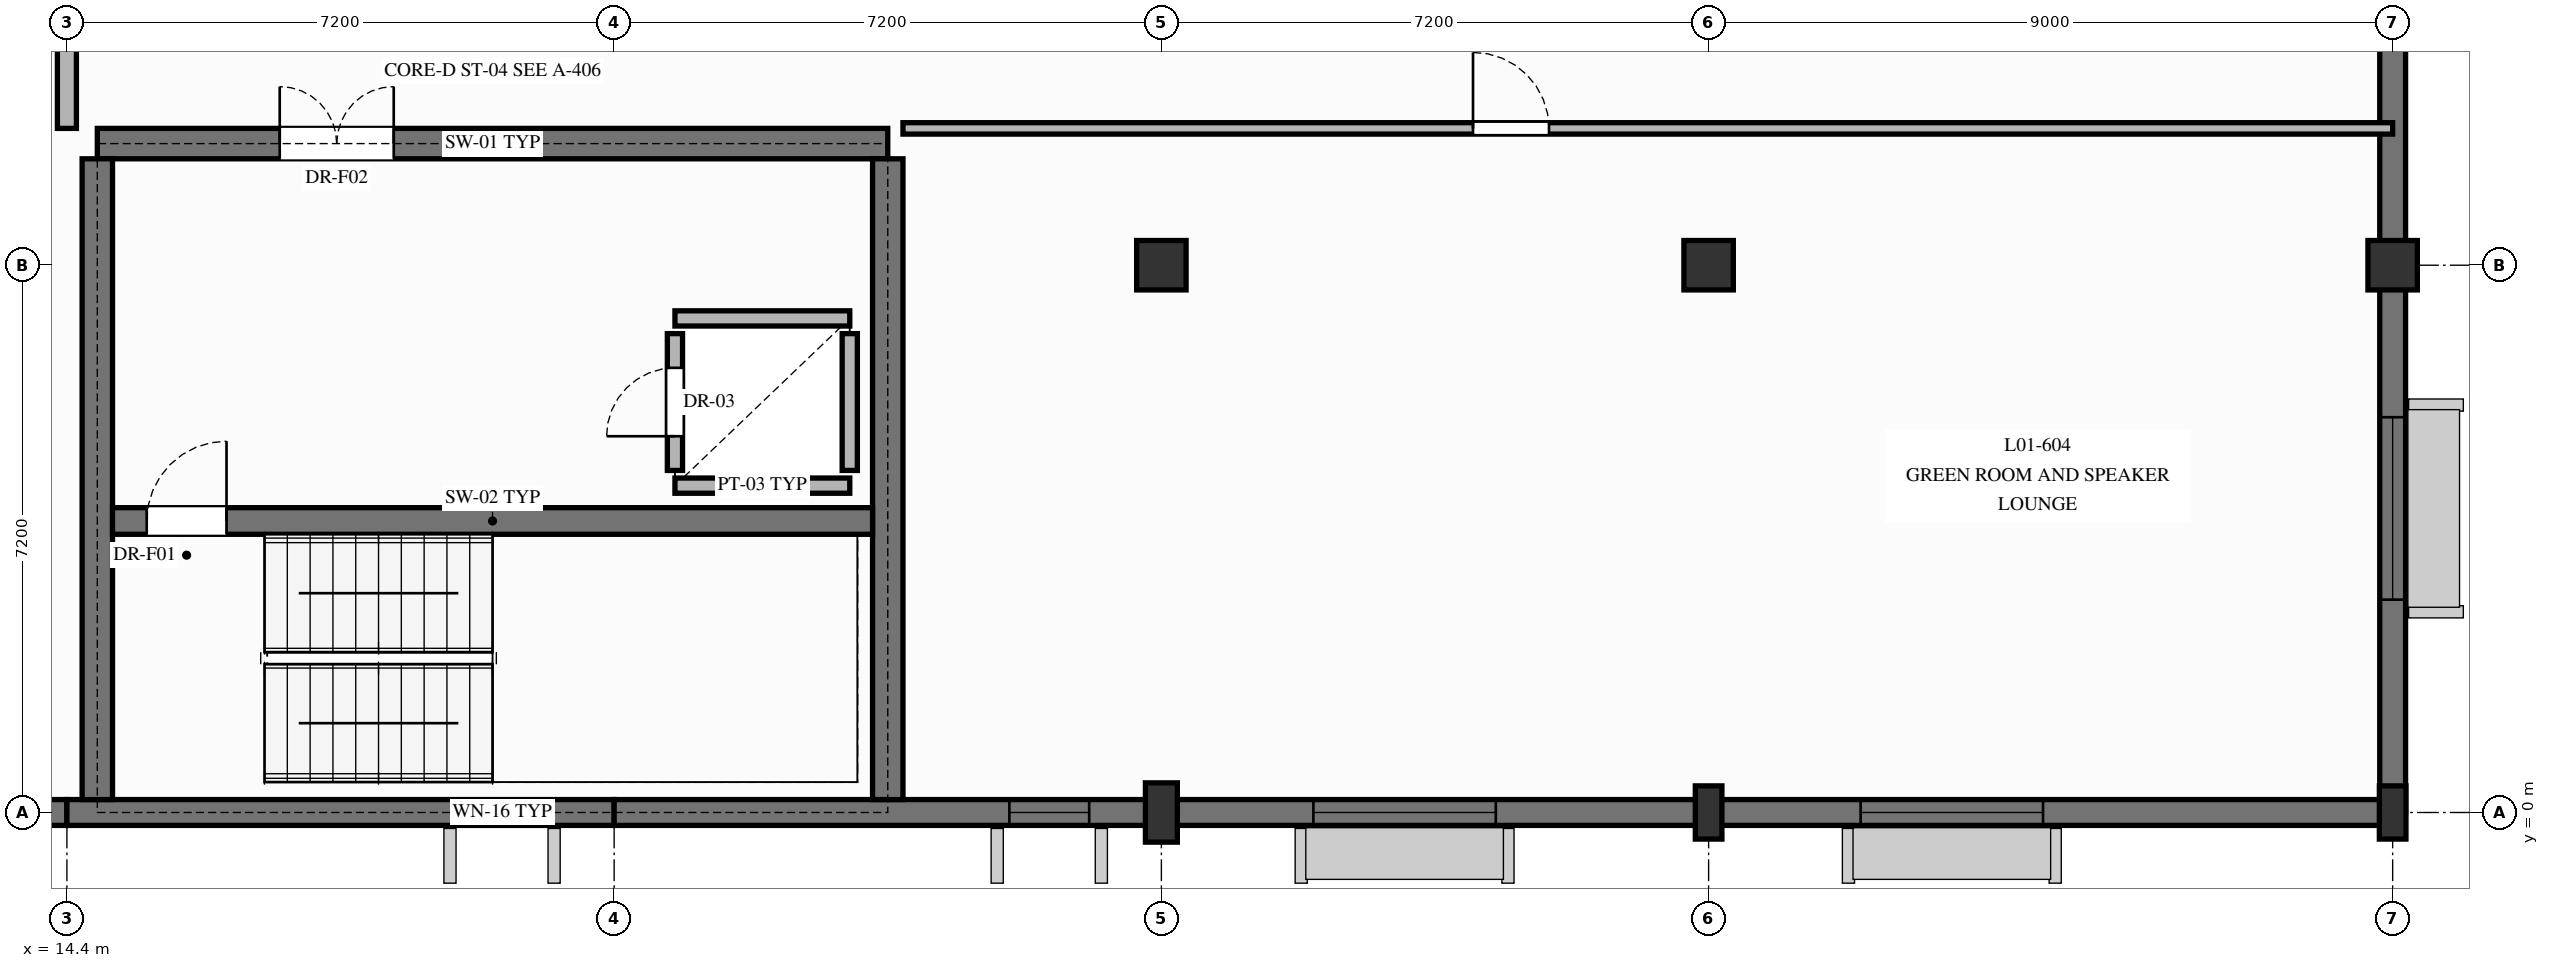
"""IFC4 building model, lengths in metres.
Left out: names, types, materials, properties, quantities, classifications, styles, units other than length and angle.
Written with IfcOpenShell. Run it as: python <this file> out.ifc"""

import sys

from ifc_helpers import new_model, si_unit, direction, frame, frame_2d, origin, origin_2d, place, context, subcontext, project, spatial, rectangle, extrude, element, fill, save


model = new_model("IFC4")
c1 = context("Model", 3, precision=1e-05, world=origin(), true_north=direction((0.0, 1.0)))
c2 = subcontext(c1, "Body", "Model", "MODEL_VIEW")
j1 = project(units=[si_unit("LENGTHUNIT", "METRE"), si_unit("PLANEANGLEUNIT", "RADIAN")], contexts=[c1])
p1 = place(None, origin())
s1 = spatial("IfcSite", under=j1, at=p1, CompositionType="ELEMENT")
p2 = place(p1, origin())
s2 = spatial("IfcBuilding", under=s1, at=p2, CompositionType="ELEMENT")
p3 = place(p2, frame((0.0, 0.0, 5.1)))
s3 = spatial("IfcBuildingStorey", under=s2, at=p3, CompositionType="ELEMENT", Elevation=5.1)
p4 = place(p3, frame((28.8, 0.0, 0.0), z_axis=(0.0, 0.0, 1.0), x_axis=(0.0, 1.0, 0.0)))
e1 = element("IfcColumn", 1, at=p4, inside=s3, PredefinedType="PILASTER", context=c2, shape_type="SweptSolid", body=[
    extrude(rectangle(XDim=0.42, YDim=0.78, at=origin_2d()), origin(), (0.0, 0.0, 1.0), 3.84),
])
p5 = place(p3, frame((28.8, 7.2, 0.0), z_axis=(0.0, 0.0, 1.0), x_axis=(1.0, 0.0, 0.0)))
e2 = element("IfcColumn", 2, at=p5, inside=s3, PredefinedType="COLUMN", context=c2, shape_type="SweptSolid", body=[
    extrude(rectangle(XDim=0.65, YDim=0.65, at=origin_2d()), origin(), (0.0, 0.0, 1.0), 3.84),
])
p6 = place(p3, frame((36.0, 0.0, 0.0), z_axis=(0.0, 0.0, 1.0), x_axis=(0.0, 1.0, 0.0)))
e3 = element("IfcColumn", 3, at=p6, inside=s3, PredefinedType="PILASTER", context=c2, shape_type="SweptSolid", body=[
    extrude(rectangle(XDim=0.35, YDim=0.7, at=origin_2d()), origin(), (0.0, 0.0, 1.0), 3.84),
])
p7 = place(p3, frame((36.0, 7.2, 0.0), z_axis=(0.0, 0.0, 1.0), x_axis=(1.0, 0.0, 0.0)))
e4 = element("IfcColumn", 4, at=p7, inside=s3, PredefinedType="COLUMN", context=c2, shape_type="SweptSolid", body=[
    extrude(rectangle(XDim=0.65, YDim=0.65, at=origin_2d()), origin(), (0.0, 0.0, 1.0), 3.84),
])
p8 = place(p3, frame((45.0, 0.0, 0.0), z_axis=(0.0, 0.0, 1.0), x_axis=(0.0, 1.0, 0.0)))
e5 = element("IfcColumn", 5, at=p8, inside=s3, PredefinedType="PILASTER", context=c2, shape_type="SweptSolid", body=[
    extrude(rectangle(XDim=0.35, YDim=0.7, at=origin_2d()), origin(), (0.0, 0.0, 1.0), 3.84),
])
p9 = place(p3, frame((45.0, 7.2, 0.0), z_axis=(0.0, 0.0, 1.0), x_axis=(1.0, 0.0, 0.0)))
e6 = element("IfcColumn", 6, at=p9, inside=s3, PredefinedType="COLUMN", context=c2, shape_type="SweptSolid", body=[
    extrude(rectangle(XDim=0.65, YDim=0.65, at=origin_2d()), origin(), (0.0, 0.0, 1.0), 3.84),
])
p10 = place(p3, frame((7.2, 0.0, 0.0), z_axis=(0.0, 0.0, 1.0), x_axis=(1.0, 0.0, 0.0)))
e7 = element("IfcWall", 7, at=p10, inside=s3, PredefinedType="SOLIDWALL", context=c2, shape_type="SweptSolid", body=[
    extrude(rectangle(XDim=7.2, YDim=0.34, at=frame_2d((3.6, 0.0))), origin(), (0.0, 0.0, 1.0), 3.55),
])
p11 = place(p10, frame((2.0, 0.0, 0.85)))
e8 = element("IfcOpeningElement", 8, at=p11, cuts=e7, PredefinedType="OPENING", context=c2, shape_type="SweptSolid", body=[
    extrude(rectangle(XDim=2.4, YDim=2.4, at=frame_2d((1.2, 1.2))), frame((0.0, 0.18, 0.0), z_axis=(0.0, -1.0, 0.0), x_axis=(1.0, 0.0, 0.0)), (0.0, 0.0, 1.0), 0.36),
])
p12 = place(p3, frame((14.4, 0.0, 0.0), z_axis=(0.0, 0.0, 1.0), x_axis=(1.0, 0.0, 0.0)))
e9 = element("IfcWall", 9, at=p12, inside=s3, PredefinedType="SOLIDWALL", context=c2, shape_type="SweptSolid", body=[
    extrude(rectangle(XDim=7.2, YDim=0.34, at=frame_2d((3.6, 0.0))), origin(), (0.0, 0.0, 1.0), 3.55),
])
p13 = place(p12, frame((5.2, 0.0, 1.05)))
e10 = element("IfcOpeningElement", 10, at=p13, cuts=e9, PredefinedType="OPENING", context=c2, shape_type="SweptSolid", body=[
    extrude(rectangle(XDim=1.05, YDim=1.75, at=frame_2d((0.525, 0.875))), frame((0.0, 0.18, 0.0), z_axis=(0.0, -1.0, 0.0), x_axis=(1.0, 0.0, 0.0)), (0.0, 0.0, 1.0), 0.36),
])
p14 = place(p3, frame((21.6, 0.0, 0.0), z_axis=(0.0, 0.0, 1.0), x_axis=(1.0, 0.0, 0.0)))
e11 = element("IfcWall", 11, at=p14, inside=s3, PredefinedType="SOLIDWALL", context=c2, shape_type="SweptSolid", body=[
    extrude(rectangle(XDim=7.2, YDim=0.34, at=frame_2d((3.6, 0.0))), origin(), (0.0, 0.0, 1.0), 3.55),
])
p15 = place(p14, frame((5.2, 0.0, 1.05)))
e12 = element("IfcOpeningElement", 12, at=p15, cuts=e11, PredefinedType="OPENING", context=c2, shape_type="SweptSolid", body=[
    extrude(rectangle(XDim=1.05, YDim=1.75, at=frame_2d((0.525, 0.875))), frame((0.0, 0.18, 0.0), z_axis=(0.0, -1.0, 0.0), x_axis=(1.0, 0.0, 0.0)), (0.0, 0.0, 1.0), 0.36),
])
p16 = place(p3, frame((28.8, 0.0, 0.0), z_axis=(0.0, 0.0, 1.0), x_axis=(1.0, 0.0, 0.0)))
e13 = element("IfcWall", 13, at=p16, inside=s3, PredefinedType="SOLIDWALL", context=c2, shape_type="SweptSolid", body=[
    extrude(rectangle(XDim=7.2, YDim=0.34, at=frame_2d((3.6, 0.0))), origin(), (0.0, 0.0, 1.0), 3.55),
])
p17 = place(p16, frame((2.0, 0.0, 0.435)))
e14 = element("IfcOpeningElement", 14, at=p17, cuts=e13, PredefinedType="OPENING", context=c2, shape_type="SweptSolid", body=[
    extrude(rectangle(XDim=2.4, YDim=2.4, at=frame_2d((1.2, 1.2))), frame((0.0, 0.18, 0.0), z_axis=(0.0, -1.0, 0.0), x_axis=(1.0, 0.0, 0.0)), (0.0, 0.0, 1.0), 0.36),
])
p18 = place(p3, frame((36.0, 0.0, 0.0), z_axis=(0.0, 0.0, 1.0), x_axis=(1.0, 0.0, 0.0)))
e15 = element("IfcWall", 15, at=p18, inside=s3, PredefinedType="SOLIDWALL", context=c2, shape_type="SweptSolid", body=[
    extrude(rectangle(XDim=9.0, YDim=0.34, at=frame_2d((4.5, 0.0))), origin(), (0.0, 0.0, 1.0), 3.55),
])
p19 = place(p18, frame((2.0, 0.0, 0.375)))
e16 = element("IfcOpeningElement", 16, at=p19, cuts=e15, PredefinedType="OPENING", context=c2, shape_type="SweptSolid", body=[
    extrude(rectangle(XDim=2.4, YDim=2.4, at=frame_2d((1.2, 1.2))), frame((0.0, 0.18, 0.0), z_axis=(0.0, -1.0, 0.0), x_axis=(1.0, 0.0, 0.0)), (0.0, 0.0, 1.0), 0.36),
])
p20 = place(p3, frame((45.0, 0.0, 0.0), z_axis=(0.0, 0.0, 1.0), x_axis=(0.0, 1.0, 0.0)))
e17 = element("IfcWall", 17, at=p20, inside=s3, PredefinedType="SOLIDWALL", context=c2, shape_type="SweptSolid", body=[
    extrude(rectangle(XDim=28.8, YDim=0.34, at=frame_2d((14.4, 0.0))), origin(), (0.0, 0.0, 1.0), 3.55),
])
p21 = place(p20, frame((2.8, 0.0, 0.255)))
e18 = element("IfcOpeningElement", 18, at=p21, cuts=e17, PredefinedType="OPENING", context=c2, shape_type="SweptSolid", body=[
    extrude(rectangle(XDim=2.4, YDim=2.4, at=frame_2d((1.2, 1.2))), frame((0.0, 0.18, 0.0), z_axis=(0.0, -1.0, 0.0), x_axis=(1.0, 0.0, 0.0)), (0.0, 0.0, 1.0), 0.36),
])
p22 = place(p20, frame((15.2, 0.0, 0.605)))
e19 = element("IfcOpeningElement", 19, at=p22, cuts=e17, PredefinedType="OPENING", context=c2, shape_type="SweptSolid", body=[
    extrude(rectangle(XDim=1.6, YDim=2.05, at=frame_2d((0.8, 1.025))), frame((0.0, 0.18, 0.0), z_axis=(0.0, -1.0, 0.0), x_axis=(1.0, 0.0, 0.0)), (0.0, 0.0, 1.0), 0.36),
])
p23 = place(p3, frame((14.8, 8.8, 0.0), z_axis=(0.0, 0.0, 1.0), x_axis=(1.0, 0.0, 0.0)))
e20 = element("IfcWall", 20, at=p23, inside=s3, PredefinedType="SHEAR", context=c2, shape_type="SweptSolid", body=[
    extrude(rectangle(XDim=10.4, YDim=0.4, at=frame_2d((5.2, 0.0))), origin(), (0.0, 0.0, 1.0), 3.55),
])
p24 = place(p23, frame((2.4, 0.0, 0.0)))
e21 = element("IfcOpeningElement", 21, at=p24, cuts=e20, PredefinedType="OPENING", context=c2, shape_type="SweptSolid", body=[
    extrude(rectangle(XDim=1.5, YDim=2.2, at=frame_2d((0.75, 1.1))), frame((0.0, 0.21, 0.0), z_axis=(0.0, -1.0, 0.0), x_axis=(1.0, 0.0, 0.0)), (0.0, 0.0, 1.0), 0.42),
])
for number, where, z_axis, x_axis in (
    (22, (14.8, 0.17, 0.0), (0.0, 0.0, 1.0), (0.0, 1.0, 0.0)),
    (23, (25.2, 0.17, 0.0), (0.0, 0.0, 1.0), (0.0, 1.0, 0.0)),
):
    element("IfcWall", number, at=place(p3, frame(where, z_axis=z_axis, x_axis=x_axis)), inside=s3, PredefinedType="SHEAR", context=c2, shape_type="SweptSolid", body=[
        extrude(rectangle(XDim=8.43, YDim=0.4, at=frame_2d((4.215, 0.0))), origin(), (0.0, 0.0, 1.0), 3.55),
    ])
p25 = place(p3, frame((15.0, 3.835, 0.0), z_axis=(0.0, 0.0, 1.0), x_axis=(1.0, 0.0, 0.0)))
e24 = element("IfcWall", 24, at=p25, inside=s3, PredefinedType="SHEAR", context=c2, shape_type="SweptSolid", body=[
    extrude(rectangle(XDim=10.0, YDim=0.35, at=frame_2d((5.0, 0.0))), origin(), (0.0, 0.0, 1.0), 3.55),
])
p26 = place(p25, frame((0.45, 0.0, 0.0)))
e25 = element("IfcOpeningElement", 25, at=p26, cuts=e24, PredefinedType="OPENING", context=c2, shape_type="SweptSolid", body=[
    extrude(rectangle(XDim=1.05, YDim=2.2, at=frame_2d((0.525, 1.1))), frame((0.0, 0.185, 0.0), z_axis=(0.0, -1.0, 0.0), x_axis=(1.0, 0.0, 0.0)), (0.0, 0.0, 1.0), 0.37),
])
for number, where, z_axis, x_axis in (
    (26, (22.4, 4.3, 0.0), (0.0, 0.0, 1.0), (1.0, 0.0, 0.0)),
    (27, (22.4, 6.5, 0.0), (0.0, 0.0, 1.0), (1.0, 0.0, 0.0)),
):
    element("IfcWall", number, at=place(p3, frame(where, z_axis=z_axis, x_axis=x_axis)), inside=s3, PredefinedType="PARTITIONING", context=c2, shape_type="SweptSolid", body=[
        extrude(rectangle(XDim=2.3, YDim=0.2, at=frame_2d((1.15, 0.0))), origin(), (0.0, 0.0, 1.0), 3.55),
    ])
p27 = place(p3, frame((22.4, 4.5, 0.0), z_axis=(0.0, 0.0, 1.0), x_axis=(0.0, 1.0, 0.0)))
e28 = element("IfcWall", 28, at=p27, inside=s3, PredefinedType="PARTITIONING", context=c2, shape_type="SweptSolid", body=[
    extrude(rectangle(XDim=1.8, YDim=0.2, at=frame_2d((0.9, 0.0))), origin(), (0.0, 0.0, 1.0), 3.55),
])
p28 = place(p27, frame((0.45, 0.0, 0.0)))
e29 = element("IfcOpeningElement", 29, at=p28, cuts=e28, PredefinedType="OPENING", context=c2, shape_type="SweptSolid", body=[
    extrude(rectangle(XDim=0.9, YDim=2.1, at=frame_2d((0.45, 1.05))), frame((0.0, 0.11, 0.0), z_axis=(0.0, -1.0, 0.0), x_axis=(1.0, 0.0, 0.0)), (0.0, 0.0, 1.0), 0.22),
])
p29 = place(p3, frame((24.7, 4.5, 0.0), z_axis=(0.0, 0.0, 1.0), x_axis=(0.0, 1.0, 0.0)))
e30 = element("IfcWall", 30, at=p29, inside=s3, PredefinedType="PARTITIONING", context=c2, shape_type="SweptSolid", body=[
    extrude(rectangle(XDim=1.8, YDim=0.2, at=frame_2d((0.9, 0.0))), origin(), (0.0, 0.0, 1.0), 3.55),
])
p30 = place(p3, frame((14.4, 9.0, 0.0), z_axis=(0.0, 0.0, 1.0), x_axis=(0.0, 1.0, 0.0)))
e31 = element("IfcWall", 31, at=p30, inside=s3, PredefinedType="PARTITIONING", context=c2, shape_type="SweptSolid", body=[
    extrude(rectangle(XDim=19.8, YDim=0.25, at=frame_2d((9.9, 0.0))), origin(), (0.0, 0.0, 1.0), 2.755),
])
p31 = place(p30, frame((1.8, 0.0, 0.0)))
e32 = element("IfcOpeningElement", 32, at=p31, cuts=e31, PredefinedType="OPENING", context=c2, shape_type="SweptSolid", body=[
    extrude(rectangle(XDim=1.8, YDim=2.3, at=frame_2d((0.9, 1.15))), frame((0.0, 0.135, 0.0), z_axis=(0.0, -1.0, 0.0), x_axis=(1.0, 0.0, 0.0)), (0.0, 0.0, 1.0), 0.27),
])
p32 = place(p30, frame((8.2, 0.0, 0.0)))
e33 = element("IfcOpeningElement", 33, at=p32, cuts=e31, PredefinedType="OPENING", context=c2, shape_type="SweptSolid", body=[
    extrude(rectangle(XDim=1.8, YDim=2.3, at=frame_2d((0.9, 1.15))), frame((0.0, 0.135, 0.0), z_axis=(0.0, -1.0, 0.0), x_axis=(1.0, 0.0, 0.0)), (0.0, 0.0, 1.0), 0.27),
])
p33 = place(p3, frame((25.4, 9.0, 0.0), z_axis=(0.0, 0.0, 1.0), x_axis=(1.0, 0.0, 0.0)))
e34 = element("IfcWall", 34, at=p33, inside=s3, PredefinedType="PARTITIONING", context=c2, shape_type="SweptSolid", body=[
    extrude(rectangle(XDim=19.6, YDim=0.15, at=frame_2d((9.8, 0.0))), origin(), (0.0, 0.0, 1.0), 3.55),
])
p34 = place(p33, frame((7.5, 0.0, 0.0)))
e35 = element("IfcOpeningElement", 35, at=p34, cuts=e34, PredefinedType="OPENING", context=c2, shape_type="SweptSolid", body=[
    extrude(rectangle(XDim=1.0, YDim=2.15, at=frame_2d((0.5, 1.075))), frame((0.0, 0.085, 0.0), z_axis=(0.0, -1.0, 0.0), x_axis=(1.0, 0.0, 0.0)), (0.0, 0.0, 1.0), 0.17),
])
p35 = place(p13, origin())
e36 = element("IfcWindow", 36, at=p35, inside=s3, PartitioningType="SINGLE_PANEL", PredefinedType="WINDOW", context=c2, shape_type="SweptSolid", body=[
    extrude(rectangle(XDim=1.05, YDim=1.75, at=frame_2d((0.525, 0.875))), frame((0.0, 0.03, 0.0), z_axis=(0.0, -1.0, 0.0), x_axis=(1.0, 0.0, 0.0)), (0.0, 0.0, 1.0), 0.06),
])
fill(e10, e36)
p36 = place(p15, origin())
e37 = element("IfcWindow", 37, at=p36, inside=s3, PartitioningType="SINGLE_PANEL", PredefinedType="WINDOW", context=c2, shape_type="SweptSolid", body=[
    extrude(rectangle(XDim=1.05, YDim=1.75, at=frame_2d((0.525, 0.875))), frame((0.0, 0.03, 0.0), z_axis=(0.0, -1.0, 0.0), x_axis=(1.0, 0.0, 0.0)), (0.0, 0.0, 1.0), 0.06),
])
fill(e12, e37)
p37 = place(p17, origin())
e38 = element("IfcWindow", 38, at=p37, inside=s3, PartitioningType="SINGLE_PANEL", PredefinedType="WINDOW", context=c2, shape_type="SweptSolid", body=[
    extrude(rectangle(XDim=2.4, YDim=2.4, at=frame_2d((1.2, 1.2))), frame((0.0, 0.03, 0.0), z_axis=(0.0, -1.0, 0.0), x_axis=(1.0, 0.0, 0.0)), (0.0, 0.0, 1.0), 0.06),
])
fill(e14, e38)
p38 = place(p19, origin())
e39 = element("IfcWindow", 39, at=p38, inside=s3, PartitioningType="SINGLE_PANEL", PredefinedType="WINDOW", context=c2, shape_type="SweptSolid", body=[
    extrude(rectangle(XDim=2.4, YDim=2.4, at=frame_2d((1.2, 1.2))), frame((0.0, 0.03, 0.0), z_axis=(0.0, -1.0, 0.0), x_axis=(1.0, 0.0, 0.0)), (0.0, 0.0, 1.0), 0.06),
])
fill(e16, e39)
p39 = place(p21, origin())
e40 = element("IfcWindow", 40, at=p39, inside=s3, PartitioningType="SINGLE_PANEL", PredefinedType="WINDOW", context=c2, shape_type="SweptSolid", body=[
    extrude(rectangle(XDim=2.4, YDim=2.4, at=frame_2d((1.2, 1.2))), frame((0.0, 0.03, 0.0), z_axis=(0.0, -1.0, 0.0), x_axis=(1.0, 0.0, 0.0)), (0.0, 0.0, 1.0), 0.06),
])
fill(e18, e40)
p40 = place(p24, origin())
e41 = element("IfcDoor", 41, at=p40, inside=s3, OperationType="DOUBLE_DOOR_SINGLE_SWING", PredefinedType="DOOR", context=c2, shape_type="SweptSolid", body=[
    extrude(rectangle(XDim=1.5, YDim=2.2, at=frame_2d((0.75, 1.1))), frame((0.0, 0.025, 0.0), z_axis=(0.0, -1.0, 0.0), x_axis=(1.0, 0.0, 0.0)), (0.0, 0.0, 1.0), 0.05),
])
fill(e21, e41)
p41 = place(p26, origin())
e42 = element("IfcDoor", 42, at=p41, inside=s3, OperationType="SINGLE_SWING_RIGHT", PredefinedType="DOOR", context=c2, shape_type="SweptSolid", body=[
    extrude(rectangle(XDim=1.05, YDim=2.2, at=frame_2d((0.525, 1.1))), frame((0.0, 0.025, 0.0), z_axis=(0.0, -1.0, 0.0), x_axis=(1.0, 0.0, 0.0)), (0.0, 0.0, 1.0), 0.05),
])
fill(e25, e42)
p42 = place(p28, origin())
e43 = element("IfcDoor", 43, at=p42, inside=s3, OperationType="SINGLE_SWING_LEFT", PredefinedType="DOOR", context=c2, shape_type="SweptSolid", body=[
    extrude(rectangle(XDim=0.9, YDim=2.1, at=frame_2d((0.45, 1.05))), frame((0.0, 0.025, 0.0), z_axis=(0.0, -1.0, 0.0), x_axis=(1.0, 0.0, 0.0)), (0.0, 0.0, 1.0), 0.05),
])
fill(e29, e43)
p43 = place(p34, origin())
e44 = element("IfcDoor", 44, at=p43, inside=s3, OperationType="SINGLE_SWING_LEFT", PredefinedType="DOOR", context=c2, shape_type="SweptSolid", body=[
    extrude(rectangle(XDim=1.0, YDim=2.15, at=frame_2d((0.5, 1.075))), frame((0.0, 0.025, 0.0), z_axis=(0.0, -1.0, 0.0), x_axis=(1.0, 0.0, 0.0)), (0.0, 0.0, 1.0), 0.05),
])
fill(e35, e44)
save(model, sys.argv[1])
